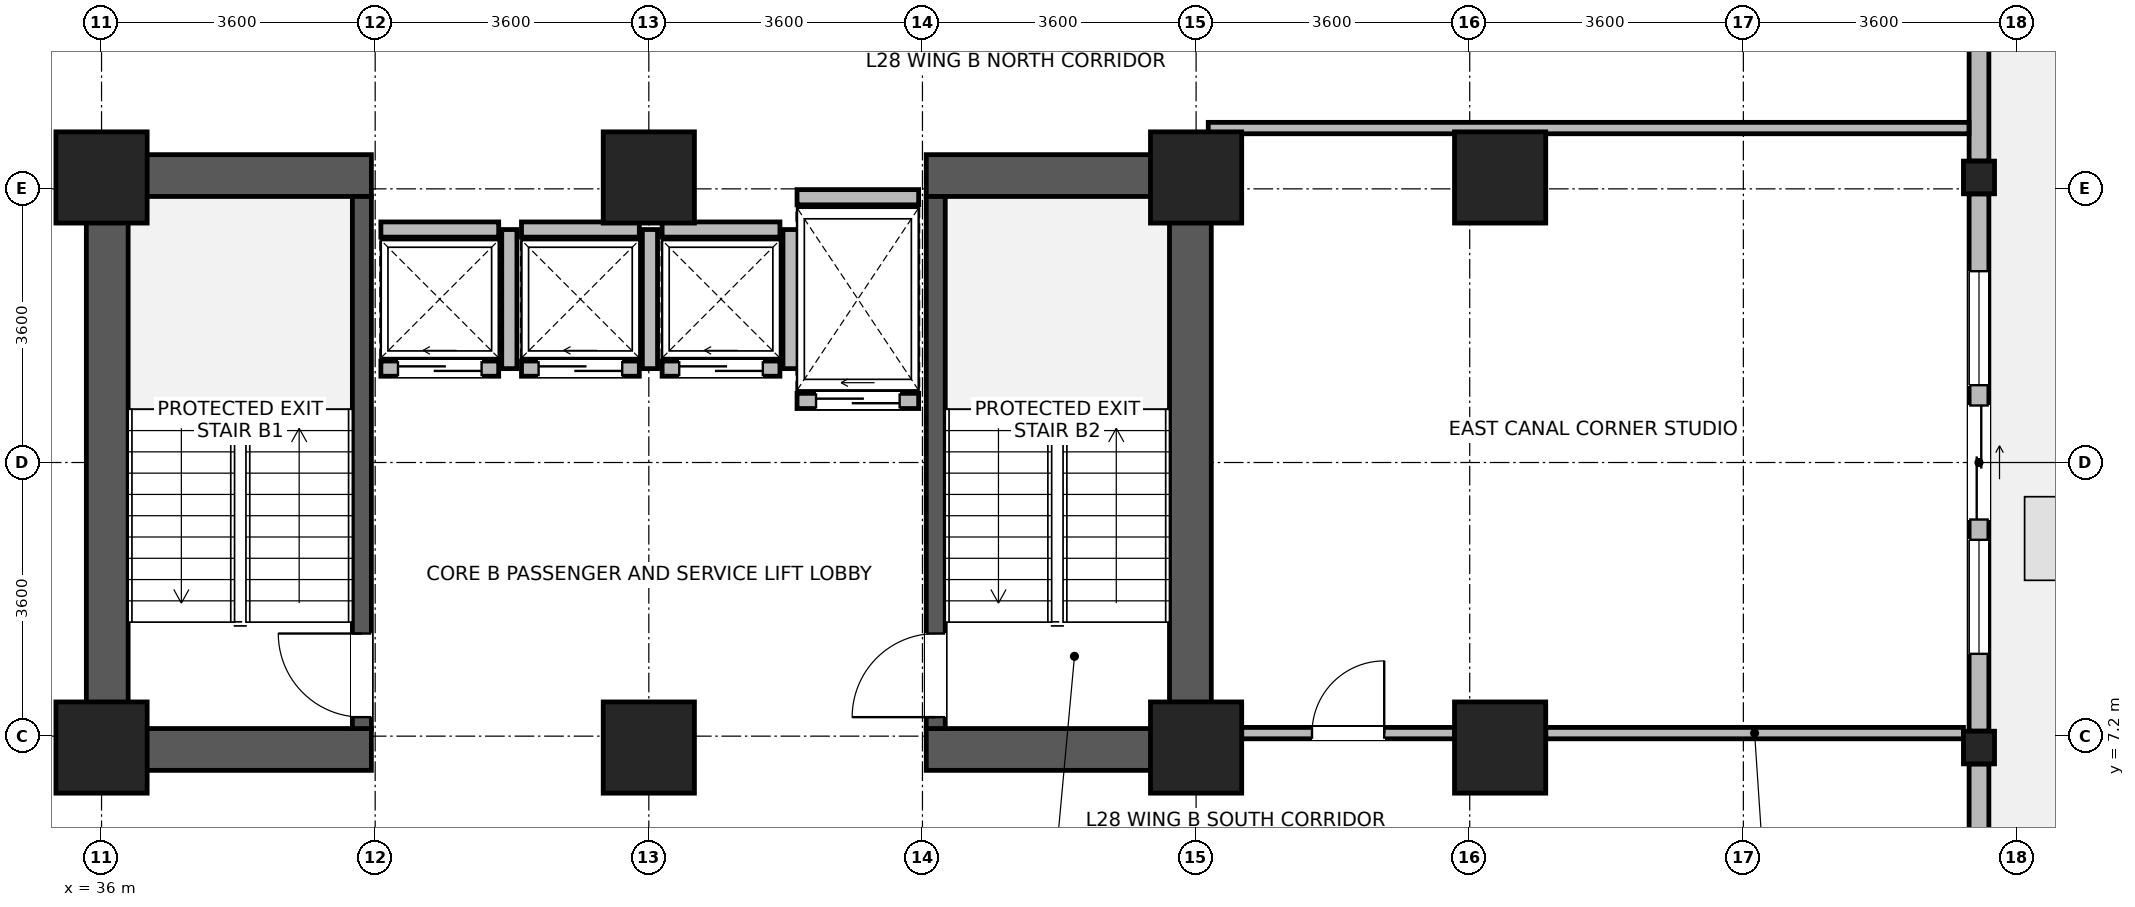
"""IFC4 building model, lengths in metres.
Left out: names, types, materials, properties, quantities, classifications, styles, units other than length and angle.
Written with IfcOpenShell. Run it as: python <this file> out.ifc"""

import sys

from ifc_helpers import new_model, si_unit, direction, frame, frame_2d, origin, origin_2d, place, context, subcontext, project, spatial, rectangle, i_section, extrude, source, transform, mapped, element, fill, save


model = new_model("IFC4")
c1 = context("Model", 3, precision=1e-05, world=origin(), true_north=direction((0.0, 1.0)))
c2 = subcontext(c1, "Body", "Model", "MODEL_VIEW")
j1 = project(units=[si_unit("LENGTHUNIT", "METRE"), si_unit("PLANEANGLEUNIT", "RADIAN")], contexts=[c1])
p1 = place(None, origin())
s1 = spatial("IfcSite", under=j1, at=p1, CompositionType="ELEMENT")
p2 = place(p1, origin())
s2 = spatial("IfcBuilding", under=s1, at=p2, CompositionType="ELEMENT")
p3 = place(p2, frame((0.0, 0.0, 111.9)))
s3 = spatial("IfcBuildingStorey", under=s2, at=p3, CompositionType="ELEMENT", Elevation=111.9)
for number, where, z_axis, x_axis in (
    (1, (36.075, 6.75, 0.0), (0.0, 0.0, 1.0), (0.0, 1.0, 0.0)),
    (2, (50.325, 6.75, 0.0), (0.0, 0.0, 1.0), (0.0, 1.0, 0.0)),
):
    element("IfcWall", number, at=place(p3, frame(where, z_axis=z_axis, x_axis=x_axis)), inside=s3, PredefinedType="SHEAR", context=c2, shape_type="SweptSolid", body=[
        extrude(rectangle(XDim=8.1, YDim=0.55, at=frame_2d((4.05, 0.0))), origin(), (0.0, 0.0, 1.0), 3.45),
    ])
for number, where, z_axis, x_axis in (
    (3, (36.35, 7.025, 0.0), (0.0, 0.0, 1.0), (1.0, 0.0, 0.0)),
    (4, (46.85, 7.025, 0.0), (0.0, 0.0, 1.0), (1.0, 0.0, 0.0)),
    (5, (36.35, 14.575, 0.0), (0.0, 0.0, 1.0), (1.0, 0.0, 0.0)),
    (6, (46.85, 14.575, 0.0), (0.0, 0.0, 1.0), (1.0, 0.0, 0.0)),
):
    element("IfcWall", number, at=place(p3, frame(where, z_axis=z_axis, x_axis=x_axis)), inside=s3, PredefinedType="SHEAR", context=c2, shape_type="SweptSolid", body=[
        extrude(rectangle(XDim=3.2, YDim=0.55, at=frame_2d((1.6, 0.0))), origin(), (0.0, 0.0, 1.0), 3.45),
    ])
p4 = place(p3, frame((39.425, 7.3, 0.0), z_axis=(0.0, 0.0, 1.0), x_axis=(0.0, 1.0, 0.0)))
e7 = element("IfcWall", 7, at=p4, inside=s3, PredefinedType="SHEAR", context=c2, shape_type="SweptSolid", body=[
    extrude(rectangle(XDim=7.0, YDim=0.25, at=frame_2d((3.5, 0.0))), origin(), (0.0, 0.0, 1.0), 3.45),
])
p5 = place(p4, frame((0.15, 0.0, 0.0)))
e8 = element("IfcOpeningElement", 8, at=p5, cuts=e7, PredefinedType="OPENING", context=c2, shape_type="SweptSolid", body=[
    extrude(rectangle(XDim=1.1, YDim=2.08, at=frame_2d((0.55, 1.04))), frame((0.0, 0.135, 0.0), z_axis=(0.0, -1.0, 0.0), x_axis=(1.0, 0.0, 0.0)), (0.0, 0.0, 1.0), 0.27),
])
p6 = place(p3, frame((46.975, 7.3, 0.0), z_axis=(0.0, 0.0, 1.0), x_axis=(0.0, 1.0, 0.0)))
e9 = element("IfcWall", 9, at=p6, inside=s3, PredefinedType="SHEAR", context=c2, shape_type="SweptSolid", body=[
    extrude(rectangle(XDim=7.0, YDim=0.25, at=frame_2d((3.5, 0.0))), origin(), (0.0, 0.0, 1.0), 3.45),
])
p7 = place(p6, frame((0.15, 0.0, 0.0)))
e10 = element("IfcOpeningElement", 10, at=p7, cuts=e9, PredefinedType="OPENING", context=c2, shape_type="SweptSolid", body=[
    extrude(rectangle(XDim=1.1, YDim=2.08, at=frame_2d((0.55, 1.04))), frame((0.0, 0.135, 0.0), z_axis=(0.0, -1.0, 0.0), x_axis=(1.0, 0.0, 0.0)), (0.0, 0.0, 1.0), 0.27),
])
m1 = source(origin(), c2, "Body", "SweptSolid", [
    extrude(rectangle(XDim=1.2, YDim=1.2, at=origin_2d()), origin(), (0.0, 0.0, 1.0), 3.7),
])
for number, where, z_axis, x_axis in (
    (11, (36.0, 7.05, 0.0), (0.0, 0.0, 1.0), (1.0, 0.0, 0.0)),
    (12, (36.0, 14.55, 0.0), (0.0, 0.0, 1.0), (1.0, 0.0, 0.0)),
    (13, (43.2, 7.05, 0.0), (0.0, 0.0, 1.0), (1.0, 0.0, 0.0)),
    (14, (43.2, 14.55, 0.0), (0.0, 0.0, 1.0), (1.0, 0.0, 0.0)),
    (15, (50.4, 7.05, 0.0), (0.0, 0.0, 1.0), (1.0, 0.0, 0.0)),
    (16, (50.4, 14.55, 0.0), (0.0, 0.0, 1.0), (1.0, 0.0, 0.0)),
    (17, (54.4, 7.05, 0.0), (0.0, 0.0, 1.0), (1.0, 0.0, 0.0)),
    (18, (54.4, 14.55, 0.0), (0.0, 0.0, 1.0), (1.0, 0.0, 0.0)),
):
    element("IfcColumn", number, at=place(p3, frame(where, z_axis=z_axis, x_axis=x_axis)), inside=s3, PredefinedType="COLUMN", context=c2, shape_type="MappedRepresentation", body=[
        mapped(m1, transform((0.0, 0.0, 0.0), x_axis=(1.0, 0.0, 0.0), y_axis=(0.0, 1.0, 0.0), z_axis=(0.0, 0.0, 1.0), scale=1.0)),
    ])
m2 = source(origin(), c2, "Body", "SweptSolid", [
    extrude(i_section(OverallWidth=0.409, OverallDepth=0.43, WebThickness=0.024, FlangeThickness=0.033, FilletRadius=0.015, at=origin_2d()), origin(), (0.0, 0.0, 1.0), 3.7),
])
for number, where, z_axis, x_axis in (
    (19, (60.7, 7.05, 0.0), (0.0, 0.0, 1.0), (1.0, 0.0, 0.0)),
    (20, (60.7, 14.55, 0.0), (0.0, 0.0, 1.0), (1.0, 0.0, 0.0)),
):
    element("IfcColumn", number, at=place(p3, frame(where, z_axis=z_axis, x_axis=x_axis)), inside=s3, PredefinedType="COLUMN", context=c2, shape_type="MappedRepresentation", body=[
        mapped(m2, transform((0.0, 0.0, 0.0), x_axis=(1.0, 0.0, 0.0), y_axis=(0.0, 1.0, 0.0), z_axis=(0.0, 0.0, 1.0), scale=1.0)),
    ])
p8 = place(p3, frame((60.7, 6.834, 0.0), z_axis=(0.0, 0.0, 1.0), x_axis=(0.0, -1.0, 0.0)))
e21 = element("IfcWall", 21, at=p8, inside=s3, PredefinedType="STANDARD", context=c2, shape_type="SweptSolid", body=[
    extrude(rectangle(XDim=2.164, YDim=0.26, at=frame_2d((1.082, 0.0))), origin(), (0.0, 0.0, 1.0), 3.43),
])
p9 = place(p3, frame((60.7, 14.334, 0.0), z_axis=(0.0, 0.0, 1.0), x_axis=(0.0, -1.0, 0.0)))
e22 = element("IfcWall", 22, at=p9, inside=s3, PredefinedType="STANDARD", context=c2, shape_type="SweptSolid", body=[
    extrude(rectangle(XDim=7.068, YDim=0.26, at=frame_2d((3.534, 0.0))), origin(), (0.0, 0.0, 1.0), 2.98),
])
p10 = place(p9, frame((2.784, 0.0, 0.0)))
e23 = element("IfcOpeningElement", 23, at=p10, cuts=e22, PredefinedType="OPENING", context=c2, shape_type="SweptSolid", body=[
    extrude(rectangle(XDim=1.5, YDim=2.15, at=frame_2d((0.75, 1.075))), frame((0.0, 0.14, 0.0), z_axis=(0.0, -1.0, 0.0), x_axis=(1.0, 0.0, 0.0)), (0.0, 0.0, 1.0), 0.28),
])
p11 = place(p9, frame((1.017, 0.0, 0.85)))
e24 = element("IfcOpeningElement", 24, at=p11, cuts=e22, PredefinedType="OPENING", context=c2, shape_type="SweptSolid", body=[
    extrude(rectangle(XDim=1.5, YDim=1.85, at=frame_2d((0.75, 0.925))), frame((0.0, 0.14, 0.0), z_axis=(0.0, -1.0, 0.0), x_axis=(1.0, 0.0, 0.0)), (0.0, 0.0, 1.0), 0.28),
])
p12 = place(p9, frame((4.551, 0.0, 0.85)))
e25 = element("IfcOpeningElement", 25, at=p12, cuts=e22, PredefinedType="OPENING", context=c2, shape_type="SweptSolid", body=[
    extrude(rectangle(XDim=1.5, YDim=1.85, at=frame_2d((0.75, 0.925))), frame((0.0, 0.14, 0.0), z_axis=(0.0, -1.0, 0.0), x_axis=(1.0, 0.0, 0.0)), (0.0, 0.0, 1.0), 0.28),
])
p13 = place(p3, frame((60.7, 21.384, 0.0), z_axis=(0.0, 0.0, 1.0), x_axis=(0.0, -1.0, 0.0)))
e26 = element("IfcWall", 26, at=p13, inside=s3, PredefinedType="STANDARD", context=c2, shape_type="SweptSolid", body=[
    extrude(rectangle(XDim=6.618, YDim=0.26, at=frame_2d((3.309, 0.0))), origin(), (0.0, 0.0, 1.0), 2.98),
])
p14 = place(p13, frame((0.905, 0.0, 0.85)))
e27 = element("IfcOpeningElement", 27, at=p14, cuts=e26, PredefinedType="OPENING", context=c2, shape_type="SweptSolid", body=[
    extrude(rectangle(XDim=1.5, YDim=1.85, at=frame_2d((0.75, 0.925))), frame((0.0, 0.14, 0.0), z_axis=(0.0, -1.0, 0.0), x_axis=(1.0, 0.0, 0.0)), (0.0, 0.0, 1.0), 0.28),
])
p15 = place(p13, frame((2.834, 0.0, 0.85)))
e28 = element("IfcOpeningElement", 28, at=p15, cuts=e26, PredefinedType="OPENING", context=c2, shape_type="SweptSolid", body=[
    extrude(rectangle(XDim=0.95, YDim=1.75, at=frame_2d((0.475, 0.875))), frame((0.0, 0.14, 0.0), z_axis=(0.0, -1.0, 0.0), x_axis=(1.0, 0.0, 0.0)), (0.0, 0.0, 1.0), 0.28),
])
p16 = place(p3, frame((39.675, 12.035, 0.0), z_axis=(0.0, 0.0, 1.0), x_axis=(1.0, 0.0, 0.0)))
e29 = element("IfcWall", 29, at=p16, inside=s3, PredefinedType="PARTITIONING", context=c2, shape_type="SweptSolid", body=[
    extrude(rectangle(XDim=1.55, YDim=0.2, at=frame_2d((0.775, 0.0))), origin(), (0.0, 0.0, 1.0), 3.43),
])
p17 = place(p16, frame((0.225, 0.0, 0.0)))
e30 = element("IfcOpeningElement", 30, at=p17, cuts=e29, PredefinedType="OPENING", context=c2, shape_type="SweptSolid", body=[
    extrude(rectangle(XDim=1.1, YDim=2.12, at=frame_2d((0.55, 1.06))), frame((0.0, 0.11, 0.0), z_axis=(0.0, -1.0, 0.0), x_axis=(1.0, 0.0, 0.0)), (0.0, 0.0, 1.0), 0.22),
])
p18 = place(p3, frame((39.675, 13.865, 0.0), z_axis=(0.0, 0.0, 1.0), x_axis=(1.0, 0.0, 0.0)))
e31 = element("IfcWall", 31, at=p18, inside=s3, PredefinedType="PARTITIONING", context=c2, shape_type="SweptSolid", body=[
    extrude(rectangle(XDim=1.55, YDim=0.2, at=frame_2d((0.775, 0.0))), origin(), (0.0, 0.0, 1.0), 3.43),
])
p19 = place(p3, frame((41.365, 12.035, 0.0), z_axis=(0.0, 0.0, 1.0), x_axis=(0.0, 1.0, 0.0)))
e32 = element("IfcWall", 32, at=p19, inside=s3, PredefinedType="PARTITIONING", context=c2, shape_type="SweptSolid", body=[
    extrude(rectangle(XDim=1.83, YDim=0.2, at=frame_2d((0.915, 0.0))), origin(), (0.0, 0.0, 1.0), 3.43),
])
p20 = place(p3, frame((41.525, 12.035, 0.0), z_axis=(0.0, 0.0, 1.0), x_axis=(1.0, 0.0, 0.0)))
e33 = element("IfcWall", 33, at=p20, inside=s3, PredefinedType="PARTITIONING", context=c2, shape_type="SweptSolid", body=[
    extrude(rectangle(XDim=1.55, YDim=0.2, at=frame_2d((0.775, 0.0))), origin(), (0.0, 0.0, 1.0), 3.43),
])
p21 = place(p20, frame((0.225, 0.0, 0.0)))
e34 = element("IfcOpeningElement", 34, at=p21, cuts=e33, PredefinedType="OPENING", context=c2, shape_type="SweptSolid", body=[
    extrude(rectangle(XDim=1.1, YDim=2.12, at=frame_2d((0.55, 1.06))), frame((0.0, 0.11, 0.0), z_axis=(0.0, -1.0, 0.0), x_axis=(1.0, 0.0, 0.0)), (0.0, 0.0, 1.0), 0.22),
])
p22 = place(p3, frame((41.525, 13.865, 0.0), z_axis=(0.0, 0.0, 1.0), x_axis=(1.0, 0.0, 0.0)))
e35 = element("IfcWall", 35, at=p22, inside=s3, PredefinedType="PARTITIONING", context=c2, shape_type="SweptSolid", body=[
    extrude(rectangle(XDim=1.55, YDim=0.2, at=frame_2d((0.775, 0.0))), origin(), (0.0, 0.0, 1.0), 3.43),
])
p23 = place(p3, frame((43.215, 12.035, 0.0), z_axis=(0.0, 0.0, 1.0), x_axis=(0.0, 1.0, 0.0)))
e36 = element("IfcWall", 36, at=p23, inside=s3, PredefinedType="PARTITIONING", context=c2, shape_type="SweptSolid", body=[
    extrude(rectangle(XDim=1.83, YDim=0.2, at=frame_2d((0.915, 0.0))), origin(), (0.0, 0.0, 1.0), 3.43),
])
p24 = place(p3, frame((43.375, 12.035, 0.0), z_axis=(0.0, 0.0, 1.0), x_axis=(1.0, 0.0, 0.0)))
e37 = element("IfcWall", 37, at=p24, inside=s3, PredefinedType="PARTITIONING", context=c2, shape_type="SweptSolid", body=[
    extrude(rectangle(XDim=1.55, YDim=0.2, at=frame_2d((0.775, 0.0))), origin(), (0.0, 0.0, 1.0), 3.43),
])
p25 = place(p24, frame((0.225, 0.0, 0.0)))
e38 = element("IfcOpeningElement", 38, at=p25, cuts=e37, PredefinedType="OPENING", context=c2, shape_type="SweptSolid", body=[
    extrude(rectangle(XDim=1.1, YDim=2.12, at=frame_2d((0.55, 1.06))), frame((0.0, 0.11, 0.0), z_axis=(0.0, -1.0, 0.0), x_axis=(1.0, 0.0, 0.0)), (0.0, 0.0, 1.0), 0.22),
])
p26 = place(p3, frame((43.375, 13.865, 0.0), z_axis=(0.0, 0.0, 1.0), x_axis=(1.0, 0.0, 0.0)))
e39 = element("IfcWall", 39, at=p26, inside=s3, PredefinedType="PARTITIONING", context=c2, shape_type="SweptSolid", body=[
    extrude(rectangle(XDim=1.55, YDim=0.2, at=frame_2d((0.775, 0.0))), origin(), (0.0, 0.0, 1.0), 3.43),
])
p27 = place(p3, frame((45.065, 12.035, 0.0), z_axis=(0.0, 0.0, 1.0), x_axis=(0.0, 1.0, 0.0)))
e40 = element("IfcWall", 40, at=p27, inside=s3, PredefinedType="PARTITIONING", context=c2, shape_type="SweptSolid", body=[
    extrude(rectangle(XDim=1.83, YDim=0.2, at=frame_2d((0.915, 0.0))), origin(), (0.0, 0.0, 1.0), 3.43),
])
p28 = place(p3, frame((45.15, 11.61, 0.0), z_axis=(0.0, 0.0, 1.0), x_axis=(1.0, 0.0, 0.0)))
e41 = element("IfcWall", 41, at=p28, inside=s3, PredefinedType="PARTITIONING", context=c2, shape_type="SweptSolid", body=[
    extrude(rectangle(XDim=1.6, YDim=0.2, at=frame_2d((0.8, 0.0))), origin(), (0.0, 0.0, 1.0), 3.43),
])
p29 = place(p28, frame((0.25, 0.0, 0.0)))
e42 = element("IfcOpeningElement", 42, at=p29, cuts=e41, PredefinedType="OPENING", context=c2, shape_type="SweptSolid", body=[
    extrude(rectangle(XDim=1.1, YDim=2.12, at=frame_2d((0.55, 1.06))), frame((0.0, 0.11, 0.0), z_axis=(0.0, -1.0, 0.0), x_axis=(1.0, 0.0, 0.0)), (0.0, 0.0, 1.0), 0.22),
])
p30 = place(p3, frame((45.15, 14.29, 0.0), z_axis=(0.0, 0.0, 1.0), x_axis=(1.0, 0.0, 0.0)))
e43 = element("IfcWall", 43, at=p30, inside=s3, PredefinedType="PARTITIONING", context=c2, shape_type="SweptSolid", body=[
    extrude(rectangle(XDim=1.6, YDim=0.2, at=frame_2d((0.8, 0.0))), origin(), (0.0, 0.0, 1.0), 2.43),
])
p31 = place(p3, frame((51.0, 7.24, 0.0), z_axis=(0.0, 0.0, 1.0), x_axis=(1.0, 0.0, 0.0)))
e44 = element("IfcWall", 44, at=p31, inside=s3, PredefinedType="PARTITIONING", context=c2, shape_type="SweptSolid", body=[
    extrude(rectangle(XDim=2.8, YDim=0.15, at=frame_2d((1.4, 0.0))), origin(), (0.0, 0.0, 1.0), 2.78),
])
p32 = place(p31, frame((0.925, 0.0, 0.0)))
e45 = element("IfcOpeningElement", 45, at=p32, cuts=e44, PredefinedType="OPENING", context=c2, shape_type="SweptSolid", body=[
    extrude(rectangle(XDim=0.95, YDim=2.1, at=frame_2d((0.475, 1.05))), frame((0.0, 0.085, 0.0), z_axis=(0.0, -1.0, 0.0), x_axis=(1.0, 0.0, 0.0)), (0.0, 0.0, 1.0), 0.17),
])
p33 = place(p3, frame((55.0, 7.24, 0.0), z_axis=(0.0, 0.0, 1.0), x_axis=(1.0, 0.0, 0.0)))
e46 = element("IfcWall", 46, at=p33, inside=s3, PredefinedType="PARTITIONING", context=c2, shape_type="SweptSolid", body=[
    extrude(rectangle(XDim=5.496, YDim=0.15, at=frame_2d((2.748, 0.0))), origin(), (0.0, 0.0, 1.0), 2.78),
])
p34 = place(p3, frame((50.56, 15.2, 0.0), z_axis=(0.0, 0.0, 1.0), x_axis=(1.0, 0.0, 0.0)))
e47 = element("IfcWall", 47, at=p34, inside=s3, PredefinedType="PARTITIONING", context=c2, shape_type="SweptSolid", body=[
    extrude(rectangle(XDim=10.008, YDim=0.15, at=frame_2d((5.004, 0.0))), origin(), (0.0, 0.0, 1.0), 3.43),
])
p35 = place(p10, origin())
e48 = element("IfcDoor", 48, at=p35, inside=s3, OperationType="SLIDING_TO_LEFT", PredefinedType="DOOR", context=c2, shape_type="SweptSolid", body=[
    extrude(rectangle(XDim=1.5, YDim=2.15, at=frame_2d((0.75, 1.075))), frame((0.0, 0.025, 0.0), z_axis=(0.0, -1.0, 0.0), x_axis=(1.0, 0.0, 0.0)), (0.0, 0.0, 1.0), 0.05),
])
fill(e23, e48)
p36 = place(p11, origin())
e49 = element("IfcWindow", 49, at=p36, inside=s3, PartitioningType="SINGLE_PANEL", PredefinedType="WINDOW", context=c2, shape_type="SweptSolid", body=[
    extrude(rectangle(XDim=1.5, YDim=1.85, at=frame_2d((0.75, 0.925))), frame((0.0, 0.03, 0.0), z_axis=(0.0, -1.0, 0.0), x_axis=(1.0, 0.0, 0.0)), (0.0, 0.0, 1.0), 0.06),
])
fill(e24, e49)
p37 = place(p12, origin())
e50 = element("IfcWindow", 50, at=p37, inside=s3, PartitioningType="SINGLE_PANEL", PredefinedType="WINDOW", context=c2, shape_type="SweptSolid", body=[
    extrude(rectangle(XDim=1.5, YDim=1.85, at=frame_2d((0.75, 0.925))), frame((0.0, 0.03, 0.0), z_axis=(0.0, -1.0, 0.0), x_axis=(1.0, 0.0, 0.0)), (0.0, 0.0, 1.0), 0.06),
])
fill(e25, e50)
p38 = place(p5, origin())
e51 = element("IfcDoor", 51, at=p38, inside=s3, OperationType="SINGLE_SWING_RIGHT", PredefinedType="DOOR", context=c2, shape_type="SweptSolid", body=[
    extrude(rectangle(XDim=1.1, YDim=2.08, at=frame_2d((0.55, 1.04))), frame((0.0, 0.025, 0.0), z_axis=(0.0, -1.0, 0.0), x_axis=(1.0, 0.0, 0.0)), (0.0, 0.0, 1.0), 0.05),
])
fill(e8, e51)
p39 = place(p7, origin())
e52 = element("IfcDoor", 52, at=p39, inside=s3, OperationType="SINGLE_SWING_LEFT", PredefinedType="DOOR", context=c2, shape_type="SweptSolid", body=[
    extrude(rectangle(XDim=1.1, YDim=2.08, at=frame_2d((0.55, 1.04))), frame((0.0, 0.025, 0.0), z_axis=(0.0, -1.0, 0.0), x_axis=(1.0, 0.0, 0.0)), (0.0, 0.0, 1.0), 0.05),
])
fill(e10, e52)
p40 = place(p17, origin())
e53 = element("IfcDoor", 53, at=p40, inside=s3, OperationType="SLIDING_TO_LEFT", PredefinedType="DOOR", context=c2, shape_type="SweptSolid", body=[
    extrude(rectangle(XDim=1.1, YDim=2.12, at=frame_2d((0.55, 1.06))), frame((0.0, 0.025, 0.0), z_axis=(0.0, -1.0, 0.0), x_axis=(1.0, 0.0, 0.0)), (0.0, 0.0, 1.0), 0.05),
])
fill(e30, e53)
p41 = place(p21, origin())
e54 = element("IfcDoor", 54, at=p41, inside=s3, OperationType="SLIDING_TO_LEFT", PredefinedType="DOOR", context=c2, shape_type="SweptSolid", body=[
    extrude(rectangle(XDim=1.1, YDim=2.12, at=frame_2d((0.55, 1.06))), frame((0.0, 0.025, 0.0), z_axis=(0.0, -1.0, 0.0), x_axis=(1.0, 0.0, 0.0)), (0.0, 0.0, 1.0), 0.05),
])
fill(e34, e54)
p42 = place(p25, origin())
e55 = element("IfcDoor", 55, at=p42, inside=s3, OperationType="SLIDING_TO_LEFT", PredefinedType="DOOR", context=c2, shape_type="SweptSolid", body=[
    extrude(rectangle(XDim=1.1, YDim=2.12, at=frame_2d((0.55, 1.06))), frame((0.0, 0.025, 0.0), z_axis=(0.0, -1.0, 0.0), x_axis=(1.0, 0.0, 0.0)), (0.0, 0.0, 1.0), 0.05),
])
fill(e38, e55)
p43 = place(p29, origin())
e56 = element("IfcDoor", 56, at=p43, inside=s3, OperationType="SLIDING_TO_LEFT", PredefinedType="DOOR", context=c2, shape_type="SweptSolid", body=[
    extrude(rectangle(XDim=1.1, YDim=2.12, at=frame_2d((0.55, 1.06))), frame((0.0, 0.025, 0.0), z_axis=(0.0, -1.0, 0.0), x_axis=(1.0, 0.0, 0.0)), (0.0, 0.0, 1.0), 0.05),
])
fill(e42, e56)
p44 = place(p32, origin())
e57 = element("IfcDoor", 57, at=p44, inside=s3, OperationType="SINGLE_SWING_RIGHT", PredefinedType="DOOR", context=c2, shape_type="SweptSolid", body=[
    extrude(rectangle(XDim=0.95, YDim=2.1, at=frame_2d((0.475, 1.05))), frame((0.0, 0.025, 0.0), z_axis=(0.0, -1.0, 0.0), x_axis=(1.0, 0.0, 0.0)), (0.0, 0.0, 1.0), 0.05),
])
fill(e45, e57)
save(model, sys.argv[1])
